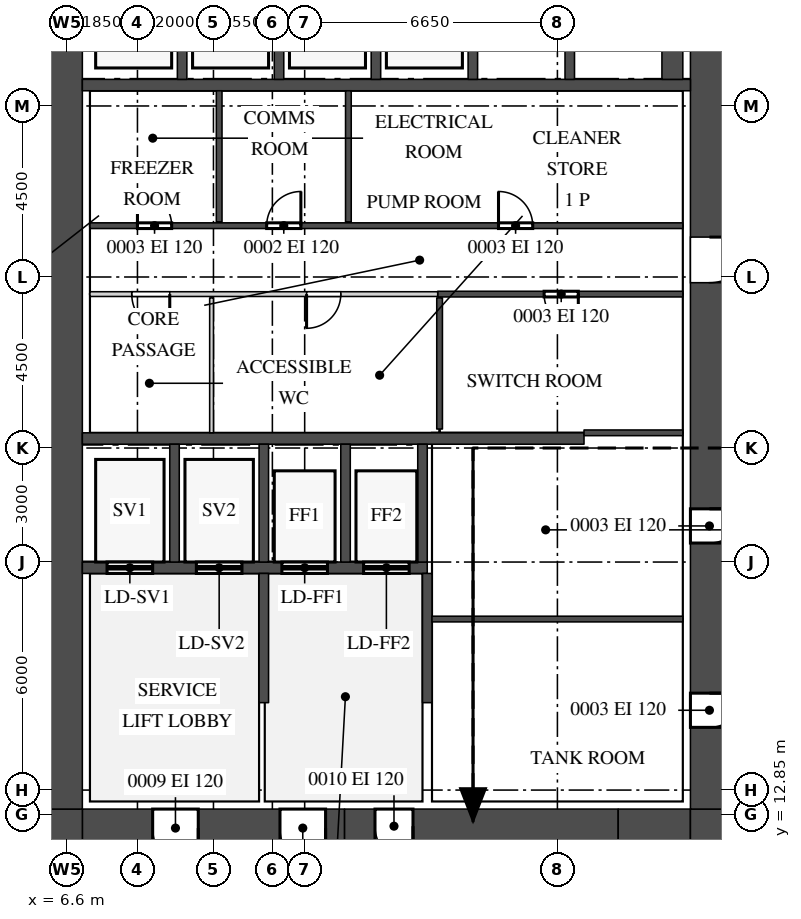
"""IFC4 building model, lengths in metres.
Left out: names, types, materials, properties, quantities, classifications, styles, units other than length and angle.
Written with IfcOpenShell. Run it as: python <this file> out.ifc"""

import sys

from ifc_helpers import new_model, si_unit, direction, frame, frame_2d, origin, place, context, subcontext, project, spatial, rectangle, extrude, source, transform, mapped, element, fill, save


model = new_model("IFC4")
c1 = context("Model", 3, precision=1e-05, world=origin(), true_north=direction((0.0, 1.0)))
c2 = subcontext(c1, "Body", "Model", "MODEL_VIEW")
j1 = project(units=[si_unit("LENGTHUNIT", "METRE"), si_unit("PLANEANGLEUNIT", "RADIAN")], contexts=[c1])
p1 = place(None, origin())
s1 = spatial("IfcSite", under=j1, at=p1, CompositionType="ELEMENT")
p2 = place(p1, origin())
s2 = spatial("IfcBuilding", under=s1, at=p2, CompositionType="ELEMENT")
p3 = place(p2, frame((0.0, 0.0, 114.7)))
s3 = spatial("IfcBuildingStorey", under=s2, at=p3, CompositionType="ELEMENT", Elevation=114.7)
m1 = source(origin(), c2, "Body", "SweptSolid", [
    extrude(rectangle(XDim=6.9, YDim=1.0, at=frame_2d((3.45, 0.0))), origin(), (0.0, 0.0, 1.0), 4.1),
])
p4 = place(p3, frame((7.0, 12.5, 0.0), z_axis=(0.0, 0.0, 1.0), x_axis=(1.0, 0.0, 0.0)))
e1 = element("IfcWall", 1, at=p4, inside=s3, PredefinedType="SHEAR", context=c2, shape_type="MappedRepresentation", body=[
    mapped(m1, transform((0.0, 0.0, 0.0))),
])
m2 = source(origin(), c2, "Body", "SweptSolid", [
    extrude(rectangle(XDim=1.2, YDim=2.1, at=frame_2d((0.6, 1.05))), frame((0.0, 0.51, 0.0), z_axis=(0.0, -1.0, 0.0), x_axis=(1.0, 0.0, 0.0)), (0.0, 0.0, 1.0), 1.02),
])
p5 = place(p4, frame((5.2, 0.0, 0.0)))
e2 = element("IfcOpeningElement", 2, at=p5, cuts=e1, PredefinedType="OPENING", context=c2, shape_type="MappedRepresentation", body=[
    mapped(m2, transform((0.0, 0.0, 0.0))),
])
p6 = place(p4, frame((1.85, 0.0, 0.0)))
e3 = element("IfcOpeningElement", 3, at=p6, cuts=e1, PredefinedType="OPENING", context=c2, shape_type="MappedRepresentation", body=[
    mapped(m2, transform((0.0, 0.0, 0.0))),
])
m3 = source(origin(), c2, "Body", "SweptSolid", [
    extrude(rectangle(XDim=7.2, YDim=0.9, at=frame_2d((3.6, 0.0))), origin(), (0.0, 0.0, 1.0), 4.1),
])
p7 = place(p3, frame((13.9, 12.55, 0.0), z_axis=(0.0, 0.0, 1.0), x_axis=(1.0, 0.0, 0.0)))
e4 = element("IfcWall", 4, at=p7, inside=s3, PredefinedType="SHEAR", context=c2, shape_type="MappedRepresentation", body=[
    mapped(m3, transform((0.0, 0.0, 0.0))),
])
m4 = source(origin(), c2, "Body", "SweptSolid", [
    extrude(rectangle(XDim=1.0, YDim=2.1, at=frame_2d((0.5, 1.05))), frame((0.0, 0.46, 0.0), z_axis=(0.0, -1.0, 0.0), x_axis=(1.0, 0.0, 0.0)), (0.0, 0.0, 1.0), 0.92),
])
p8 = place(p7, frame((0.8, 0.0, 0.0)))
e5 = element("IfcOpeningElement", 5, at=p8, cuts=e4, PredefinedType="OPENING", context=c2, shape_type="MappedRepresentation", body=[
    mapped(m4, transform((0.0, 0.0, 0.0))),
])
m5 = source(origin(), c2, "Body", "SweptSolid", [
    extrude(rectangle(XDim=1.9, YDim=1.0, at=frame_2d((0.95, 0.0))), origin(), (0.0, 0.0, 1.0), 4.1),
])
p9 = place(p3, frame((21.1, 12.5, 0.0), z_axis=(0.0, 0.0, 1.0), x_axis=(1.0, 0.0, 0.0)))
e6 = element("IfcWall", 6, at=p9, inside=s3, PredefinedType="SHEAR", context=c2, shape_type="MappedRepresentation", body=[
    mapped(m5, transform((0.0, 0.0, 0.0))),
])
m6 = source(origin(), c2, "Body", "SweptSolid", [
    extrude(rectangle(XDim=1.0, YDim=1.0, at=frame_2d((0.5, 0.0))), origin(), (0.0, 0.0, 1.0), 4.1),
])
for number, where, z_axis, x_axis in (
    (7, (23.0, 12.5, 0.0), (0.0, 0.0, 1.0), (1.0, 0.0, 0.0)),
    (8, (6.0, 12.5, 0.0), (0.0, 0.0, 1.0), (1.0, 0.0, 0.0)),
):
    element("IfcWall", number, at=place(p3, frame(where, z_axis=z_axis, x_axis=x_axis)), inside=s3, PredefinedType="SHEAR", context=c2, shape_type="MappedRepresentation", body=[
        mapped(m6, transform((0.0, 0.0, 0.0))),
    ])
m7 = source(origin(), c2, "Body", "SweptSolid", [
    extrude(rectangle(XDim=28.0, YDim=1.0, at=frame_2d((14.0, 0.0))), origin(), (0.0, 0.0, 1.0), 4.1),
])
p10 = place(p3, frame((23.5, 13.0, 0.0), z_axis=(0.0, 0.0, 1.0), x_axis=(0.0, 1.0, 0.0)))
e9 = element("IfcWall", 9, at=p10, inside=s3, PredefinedType="SHEAR", context=c2, shape_type="MappedRepresentation", body=[
    mapped(m7, transform((0.0, 0.0, 0.0))),
])
m8 = source(origin(), c2, "Body", "SweptSolid", [
    extrude(rectangle(XDim=1.8, YDim=2.1, at=frame_2d((0.9, 1.05))), frame((0.0, 0.51, 0.0), z_axis=(0.0, -1.0, 0.0), x_axis=(1.0, 0.0, 0.0)), (0.0, 0.0, 1.0), 1.02),
])
p11 = place(p10, frame((22.6, 0.0, 0.0)))
e10 = element("IfcOpeningElement", 10, at=p11, cuts=e9, PredefinedType="OPENING", context=c2, shape_type="MappedRepresentation", body=[
    mapped(m8, transform((0.0, 0.0, 0.0))),
])
p12 = place(p10, frame((13.85, 0.0, 0.0)))
e11 = element("IfcOpeningElement", 11, at=p12, cuts=e9, PredefinedType="OPENING", context=c2, shape_type="MappedRepresentation", body=[
    mapped(m2, transform((0.0, 0.0, 0.0))),
])
m9 = source(origin(), c2, "Body", "SweptSolid", [
    extrude(rectangle(XDim=0.9, YDim=2.1, at=frame_2d((0.45, 1.05))), frame((0.0, 0.51, 0.0), z_axis=(0.0, -1.0, 0.0), x_axis=(1.0, 0.0, 0.0)), (0.0, 0.0, 1.0), 1.02),
])
p13 = place(p10, frame((2.15, 0.0, 0.0)))
e12 = element("IfcOpeningElement", 12, at=p13, cuts=e9, PredefinedType="OPENING", context=c2, shape_type="MappedRepresentation", body=[
    mapped(m9, transform((0.0, 0.0, 0.0))),
])
p14 = place(p10, frame((7.0, 0.0, 0.0)))
e13 = element("IfcOpeningElement", 13, at=p14, cuts=e9, PredefinedType="OPENING", context=c2, shape_type="MappedRepresentation", body=[
    mapped(m9, transform((0.0, 0.0, 0.0))),
])
p15 = place(p3, frame((6.5, 13.0, 0.0), z_axis=(0.0, 0.0, 1.0), x_axis=(0.0, 1.0, 0.0)))
e14 = element("IfcWall", 14, at=p15, inside=s3, PredefinedType="SHEAR", context=c2, shape_type="MappedRepresentation", body=[
    mapped(m7, transform((0.0, 0.0, 0.0))),
])
m10 = source(origin(), c2, "Body", "SweptSolid", [
    extrude(rectangle(XDim=13.2, YDim=0.3, at=frame_2d((6.6, 0.0))), origin(), (0.0, 0.0, 1.0), 4.1),
])
p16 = place(p3, frame((7.0, 22.75, 0.0), z_axis=(0.0, 0.0, 1.0), x_axis=(1.0, 0.0, 0.0)))
e15 = element("IfcWall", 15, at=p16, inside=s3, PredefinedType="STANDARD", context=c2, shape_type="MappedRepresentation", body=[
    mapped(m10, transform((0.0, 0.0, 0.0))),
])
m11 = source(origin(), c2, "Body", "SweptSolid", [
    extrude(rectangle(XDim=9.075, YDim=0.3, at=frame_2d((4.538, 0.0))), origin(), (0.0, 0.0, 1.0), 4.1),
])
p17 = place(p3, frame((7.0, 19.35, 0.0), z_axis=(0.0, 0.0, 1.0), x_axis=(1.0, 0.0, 0.0)))
e16 = element("IfcWall", 16, at=p17, inside=s3, PredefinedType="STANDARD", context=c2, shape_type="MappedRepresentation", body=[
    mapped(m11, transform((0.0, 0.0, 0.0))),
])
m12 = source(origin(), c2, "Body", "SweptSolid", [
    extrude(rectangle(XDim=1.2, YDim=2.1, at=frame_2d((0.6, 1.05))), frame((0.0, 0.16, 0.0), z_axis=(0.0, -1.0, 0.0), x_axis=(1.0, 0.0, 0.0)), (0.0, 0.0, 1.0), 0.32),
])
p18 = place(p17, frame((0.65, 0.0, 0.0)))
e17 = element("IfcOpeningElement", 17, at=p18, cuts=e16, PredefinedType="OPENING", context=c2, shape_type="MappedRepresentation", body=[
    mapped(m12, transform((0.0, 0.0, 0.0))),
])
p19 = place(p17, frame((3.0, 0.0, 0.0)))
e18 = element("IfcOpeningElement", 18, at=p19, cuts=e16, PredefinedType="OPENING", context=c2, shape_type="MappedRepresentation", body=[
    mapped(m12, transform((0.0, 0.0, 0.0))),
])
p20 = place(p17, frame((5.25, 0.0, 0.0)))
e19 = element("IfcOpeningElement", 19, at=p20, cuts=e16, PredefinedType="OPENING", context=c2, shape_type="MappedRepresentation", body=[
    mapped(m12, transform((0.0, 0.0, 0.0))),
])
p21 = place(p17, frame((7.4, 0.0, 0.0)))
e20 = element("IfcOpeningElement", 20, at=p21, cuts=e16, PredefinedType="OPENING", context=c2, shape_type="MappedRepresentation", body=[
    mapped(m12, transform((0.0, 0.0, 0.0))),
])
m13 = source(origin(), c2, "Body", "SweptSolid", [
    extrude(rectangle(XDim=16.0, YDim=0.3, at=frame_2d((8.0, 0.0))), origin(), (0.0, 0.0, 1.0), 4.1),
])
p22 = place(p3, frame((7.0, 32.05, 0.0), z_axis=(0.0, 0.0, 1.0), x_axis=(1.0, 0.0, 0.0)))
e21 = element("IfcWall", 21, at=p22, inside=s3, PredefinedType="STANDARD", context=c2, shape_type="MappedRepresentation", body=[
    mapped(m13, transform((0.0, 0.0, 0.0))),
])
m14 = source(origin(), c2, "Body", "SweptSolid", [
    extrude(rectangle(XDim=3.1, YDim=0.25, at=frame_2d((1.55, 0.0))), origin(), (0.0, 0.0, 1.0), 4.1),
])
for number, where, z_axis, x_axis in (
    (22, (9.425, 19.5, 0.0), (0.0, 0.0, 1.0), (0.0, 1.0, 0.0)),
    (23, (11.775, 19.5, 0.0), (0.0, 0.0, 1.0), (0.0, 1.0, 0.0)),
    (24, (13.925, 19.5, 0.0), (0.0, 0.0, 1.0), (0.0, 1.0, 0.0)),
    (25, (15.95, 19.5, 0.0), (0.0, 0.0, 1.0), (0.0, 1.0, 0.0)),
):
    element("IfcWall", number, at=place(p3, frame(where, z_axis=z_axis, x_axis=x_axis)), inside=s3, PredefinedType="STANDARD", context=c2, shape_type="MappedRepresentation", body=[
        mapped(m14, transform((0.0, 0.0, 0.0))),
    ])
m15 = source(origin(), c2, "Body", "SweptSolid", [
    extrude(rectangle(XDim=2.4, YDim=0.25, at=frame_2d((1.2, 0.0))), origin(), (0.0, 0.0, 1.0), 4.1),
])
for number, where, z_axis, x_axis in (
    (26, (9.625, 32.2, 0.0), (0.0, 0.0, 1.0), (0.0, 1.0, 0.0)),
    (27, (12.175, 32.2, 0.0), (0.0, 0.0, 1.0), (0.0, 1.0, 0.0)),
    (28, (14.725, 32.2, 0.0), (0.0, 0.0, 1.0), (0.0, 1.0, 0.0)),
    (29, (17.275, 32.2, 0.0), (0.0, 0.0, 1.0), (0.0, 1.0, 0.0)),
    (30, (19.825, 32.2, 0.0), (0.0, 0.0, 1.0), (0.0, 1.0, 0.0)),
):
    element("IfcWall", number, at=place(p3, frame(where, z_axis=z_axis, x_axis=x_axis)), inside=s3, PredefinedType="STANDARD", context=c2, shape_type="MappedRepresentation", body=[
        mapped(m15, transform((0.0, 0.0, 0.0))),
    ])
m16 = source(origin(), c2, "Body", "SweptSolid", [
    extrude(rectangle(XDim=2.4, YDim=0.55, at=frame_2d((1.2, 0.0))), origin(), (0.0, 0.0, 1.0), 4.1),
])
p23 = place(p3, frame((22.525, 32.2, 0.0), z_axis=(0.0, 0.0, 1.0), x_axis=(0.0, 1.0, 0.0)))
e31 = element("IfcWall", 31, at=p23, inside=s3, PredefinedType="STANDARD", context=c2, shape_type="MappedRepresentation", body=[
    mapped(m16, transform((0.0, 0.0, 0.0))),
])
m17 = source(origin(), c2, "Body", "SweptSolid", [
    extrude(rectangle(XDim=3.4, YDim=0.25, at=frame_2d((1.7, 0.0))), origin(), (0.0, 0.0, 1.0), 4.1),
])
for number, where, z_axis, x_axis in (
    (32, (16.075, 15.8, 0.0), (0.0, 0.0, 1.0), (0.0, 1.0, 0.0)),
    (33, (11.775, 15.8, 0.0), (0.0, 0.0, 1.0), (0.0, 1.0, 0.0)),
):
    element("IfcWall", number, at=place(p3, frame(where, z_axis=z_axis, x_axis=x_axis)), inside=s3, PredefinedType="STANDARD", context=c2, shape_type="MappedRepresentation", body=[
        mapped(m17, transform((0.0, 0.0, 0.0))),
    ])
m18 = source(origin(), c2, "Body", "SweptSolid", [
    extrude(rectangle(XDim=6.6, YDim=0.15, at=frame_2d((3.3, 0.0))), origin(), (0.0, 0.0, 1.0), 4.2),
])
p24 = place(p3, frame((16.2, 18.0, 0.0), z_axis=(0.0, 0.0, 1.0), x_axis=(1.0, 0.0, 0.0)))
e34 = element("IfcWall", 34, at=p24, inside=s3, PredefinedType="PARTITIONING", context=c2, shape_type="MappedRepresentation", body=[
    mapped(m18, transform((0.0, 0.0, 0.0))),
])
m19 = source(origin(), c2, "Body", "SweptSolid", [
    extrude(rectangle(XDim=3.55, YDim=0.1, at=frame_2d((1.775, 0.0))), origin(), (0.0, 0.0, 1.0), 4.2),
])
p25 = place(p3, frame((10.4, 22.9, 0.0), z_axis=(0.0, 0.0, 1.0), x_axis=(0.0, 1.0, 0.0)))
e35 = element("IfcWall", 35, at=p25, inside=s3, PredefinedType="PARTITIONING", context=c2, shape_type="MappedRepresentation", body=[
    mapped(m19, transform((0.0, 0.0, 0.0))),
])
m20 = source(origin(), c2, "Body", "SweptSolid", [
    extrude(rectangle(XDim=2.6, YDim=0.15, at=frame_2d((1.3, 0.0))), origin(), (0.0, 0.0, 1.0), 4.2),
])
p26 = place(p3, frame((20.2, 22.9, 0.0), z_axis=(0.0, 0.0, 1.0), x_axis=(1.0, 0.0, 0.0)))
e36 = element("IfcWall", 36, at=p26, inside=s3, PredefinedType="PARTITIONING", context=c2, shape_type="MappedRepresentation", body=[
    mapped(m20, transform((0.0, 0.0, 0.0))),
])
m21 = source(origin(), c2, "Body", "SweptSolid", [
    extrude(rectangle(XDim=3.45, YDim=0.15, at=frame_2d((1.725, 0.0))), origin(), (0.0, 0.0, 1.0), 4.2),
])
p27 = place(p3, frame((16.4, 23.0, 0.0), z_axis=(0.0, 0.0, 1.0), x_axis=(0.0, 1.0, 0.0)))
e37 = element("IfcWall", 37, at=p27, inside=s3, PredefinedType="PARTITIONING", context=c2, shape_type="MappedRepresentation", body=[
    mapped(m21, transform((0.0, 0.0, 0.0))),
])
m22 = source(origin(), c2, "Body", "SweptSolid", [
    extrude(rectangle(XDim=9.15, YDim=0.125, at=frame_2d((4.575, 0.0))), origin(), (0.0, 0.0, 1.0), 4.2),
])
p28 = place(p3, frame((7.2, 26.55, 0.0), z_axis=(0.0, 0.0, 1.0), x_axis=(1.0, 0.0, 0.0)))
e38 = element("IfcWall", 38, at=p28, inside=s3, PredefinedType="PARTITIONING", context=c2, shape_type="MappedRepresentation", body=[
    mapped(m22, transform((0.0, 0.0, 0.0))),
])
m23 = source(origin(), c2, "Body", "SweptSolid", [
    extrude(rectangle(XDim=1.0, YDim=2.1, at=frame_2d((0.5, 1.05))), frame((0.0, 0.073, 0.0), z_axis=(0.0, -1.0, 0.0), x_axis=(1.0, 0.0, 0.0)), (0.0, 0.0, 1.0), 0.145),
])
p29 = place(p28, frame((1.1, 0.0, 0.0)))
e39 = element("IfcOpeningElement", 39, at=p29, cuts=e38, PredefinedType="OPENING", context=c2, shape_type="MappedRepresentation", body=[
    mapped(m23, transform((0.0, 0.0, 0.0))),
])
m24 = source(origin(), c2, "Body", "SweptSolid", [
    extrude(rectangle(XDim=0.9, YDim=2.1, at=frame_2d((0.45, 1.05))), frame((0.0, 0.073, 0.0), z_axis=(0.0, -1.0, 0.0), x_axis=(1.0, 0.0, 0.0)), (0.0, 0.0, 1.0), 0.145),
])
p30 = place(p28, frame((5.7, 0.0, 0.0)))
e40 = element("IfcOpeningElement", 40, at=p30, cuts=e38, PredefinedType="OPENING", context=c2, shape_type="MappedRepresentation", body=[
    mapped(m24, transform((0.0, 0.0, 0.0))),
])
m25 = source(origin(), c2, "Body", "SweptSolid", [
    extrude(rectangle(XDim=6.45, YDim=0.15, at=frame_2d((3.225, 0.0))), origin(), (0.0, 0.0, 1.0), 4.2),
])
p31 = place(p3, frame((16.35, 26.55, 0.0), z_axis=(0.0, 0.0, 1.0), x_axis=(1.0, 0.0, 0.0)))
e41 = element("IfcWall", 41, at=p31, inside=s3, PredefinedType="PARTITIONING", context=c2, shape_type="MappedRepresentation", body=[
    mapped(m25, transform((0.0, 0.0, 0.0))),
])
m26 = source(origin(), c2, "Body", "SweptSolid", [
    extrude(rectangle(XDim=0.9, YDim=2.1, at=frame_2d((0.45, 1.05))), frame((0.0, 0.085, 0.0), z_axis=(0.0, -1.0, 0.0), x_axis=(1.0, 0.0, 0.0)), (0.0, 0.0, 1.0), 0.17),
])
p32 = place(p31, frame((2.8, 0.0, 0.0)))
e42 = element("IfcOpeningElement", 42, at=p32, cuts=e41, PredefinedType="OPENING", context=c2, shape_type="MappedRepresentation", body=[
    mapped(m26, transform((0.0, 0.0, 0.0))),
])
m27 = source(origin(), c2, "Body", "SweptSolid", [
    extrude(rectangle(XDim=15.6, YDim=0.15, at=frame_2d((7.8, 0.0))), origin(), (0.0, 0.0, 1.0), 4.2),
])
p33 = place(p3, frame((7.2, 28.35, 0.0), z_axis=(0.0, 0.0, 1.0), x_axis=(1.0, 0.0, 0.0)))
e43 = element("IfcWall", 43, at=p33, inside=s3, PredefinedType="PARTITIONING", context=c2, shape_type="MappedRepresentation", body=[
    mapped(m27, transform((0.0, 0.0, 0.0))),
])
p34 = place(p33, frame((1.25, 0.0, 0.0)))
e44 = element("IfcOpeningElement", 44, at=p34, cuts=e43, PredefinedType="OPENING", context=c2, shape_type="MappedRepresentation", body=[
    mapped(m26, transform((0.0, 0.0, 0.0))),
])
p35 = place(p33, frame((4.65, 0.0, 0.0)))
e45 = element("IfcOpeningElement", 45, at=p35, cuts=e43, PredefinedType="OPENING", context=c2, shape_type="MappedRepresentation", body=[
    mapped(m26, transform((0.0, 0.0, 0.0))),
])
p36 = place(p33, frame((10.75, 0.0, 0.0)))
e46 = element("IfcOpeningElement", 46, at=p36, cuts=e43, PredefinedType="OPENING", context=c2, shape_type="MappedRepresentation", body=[
    mapped(m26, transform((0.0, 0.0, 0.0))),
])
for number, where, z_axis, x_axis in (
    (47, (10.6, 28.45, 0.0), (0.0, 0.0, 1.0), (0.0, 1.0, 0.0)),
    (48, (14.0, 28.45, 0.0), (0.0, 0.0, 1.0), (0.0, 1.0, 0.0)),
):
    element("IfcWall", number, at=place(p3, frame(where, z_axis=z_axis, x_axis=x_axis)), inside=s3, PredefinedType="PARTITIONING", context=c2, shape_type="MappedRepresentation", body=[
        mapped(m21, transform((0.0, 0.0, 0.0))),
    ])
m28 = source(origin(), c2, "Body", "SweptSolid", [
    extrude(rectangle(XDim=1.2, YDim=2.1, at=frame_2d((0.6, 1.05))), frame((0.0, 0.45, 0.0), z_axis=(0.0, -1.0, 0.0), x_axis=(1.0, 0.0, 0.0)), (0.0, 0.0, 1.0), 0.9),
])
p37 = place(p12, origin())
e49 = element("IfcDoor", 49, at=p37, inside=s3, OperationType="SINGLE_SWING_RIGHT", PredefinedType="DOOR", context=c2, shape_type="MappedRepresentation", body=[
    mapped(m28, transform((0.0, 0.0, 0.0))),
])
fill(e11, e49)
m29 = source(origin(), c2, "Body", "SweptSolid", [
    extrude(rectangle(XDim=0.9, YDim=2.1, at=frame_2d((0.45, 1.05))), frame((0.0, 0.025, 0.0), z_axis=(0.0, -1.0, 0.0), x_axis=(1.0, 0.0, 0.0)), (0.0, 0.0, 1.0), 0.05),
])
p38 = place(p34, origin())
e50 = element("IfcDoor", 50, at=p38, inside=s3, OperationType="SINGLE_SWING_RIGHT", PredefinedType="DOOR", context=c2, shape_type="MappedRepresentation", body=[
    mapped(m29, transform((0.0, 0.0, 0.0))),
])
fill(e44, e50)
p39 = place(p35, origin())
e51 = element("IfcDoor", 51, at=p39, inside=s3, OperationType="SINGLE_SWING_LEFT", PredefinedType="DOOR", context=c2, shape_type="MappedRepresentation", body=[
    mapped(m29, transform((0.0, 0.0, 0.0))),
])
fill(e45, e51)
p40 = place(p36, origin())
e52 = element("IfcDoor", 52, at=p40, inside=s3, OperationType="SINGLE_SWING_RIGHT", PredefinedType="DOOR", context=c2, shape_type="MappedRepresentation", body=[
    mapped(m29, transform((0.0, 0.0, 0.0))),
])
fill(e46, e52)
m30 = source(origin(), c2, "Body", "SweptSolid", [
    extrude(rectangle(XDim=1.0, YDim=2.1, at=frame_2d((0.5, 1.05))), frame((0.0, 0.025, 0.0), z_axis=(0.0, -1.0, 0.0), x_axis=(1.0, 0.0, 0.0)), (0.0, 0.0, 1.0), 0.05),
])
p41 = place(p29, origin())
e53 = element("IfcDoor", 53, at=p41, inside=s3, OperationType="SINGLE_SWING_RIGHT", PredefinedType="DOOR", context=c2, shape_type="MappedRepresentation", body=[
    mapped(m30, transform((0.0, 0.0, 0.0))),
])
fill(e39, e53)
p42 = place(p30, origin())
e54 = element("IfcDoor", 54, at=p42, inside=s3, OperationType="SINGLE_SWING_LEFT", PredefinedType="DOOR", context=c2, shape_type="MappedRepresentation", body=[
    mapped(m29, transform((0.0, 0.0, 0.0))),
])
fill(e40, e54)
p43 = place(p32, origin())
e55 = element("IfcDoor", 55, at=p43, inside=s3, OperationType="SINGLE_SWING_RIGHT", PredefinedType="DOOR", context=c2, shape_type="MappedRepresentation", body=[
    mapped(m29, transform((0.0, 0.0, 0.0))),
])
fill(e42, e55)
m31 = source(origin(), c2, "Body", "SweptSolid", [
    extrude(rectangle(XDim=0.9, YDim=2.1, at=frame_2d((0.45, 1.05))), frame((0.0, 0.45, 0.0), z_axis=(0.0, -1.0, 0.0), x_axis=(1.0, 0.0, 0.0)), (0.0, 0.0, 1.0), 0.9),
])
p44 = place(p13, origin())
e56 = element("IfcDoor", 56, at=p44, inside=s3, OperationType="SINGLE_SWING_RIGHT", PredefinedType="DOOR", context=c2, shape_type="MappedRepresentation", body=[
    mapped(m31, transform((0.0, 0.0, 0.0))),
])
fill(e12, e56)
p45 = place(p14, origin())
e57 = element("IfcDoor", 57, at=p45, inside=s3, OperationType="SINGLE_SWING_RIGHT", PredefinedType="DOOR", context=c2, shape_type="MappedRepresentation", body=[
    mapped(m31, transform((0.0, 0.0, 0.0))),
])
fill(e13, e57)
p46 = place(p5, origin())
e58 = element("IfcDoor", 58, at=p46, inside=s3, OperationType="SINGLE_SWING_RIGHT", PredefinedType="DOOR", context=c2, shape_type="MappedRepresentation", body=[
    mapped(m28, transform((0.0, 0.0, 0.0))),
])
fill(e2, e58)
p47 = place(p6, origin())
e59 = element("IfcDoor", 59, at=p47, inside=s3, OperationType="SINGLE_SWING_RIGHT", PredefinedType="DOOR", context=c2, shape_type="MappedRepresentation", body=[
    mapped(m28, transform((0.0, 0.0, 0.0))),
])
fill(e3, e59)
m32 = source(origin(), c2, "Body", "SweptSolid", [
    extrude(rectangle(XDim=1.0, YDim=2.1, at=frame_2d((0.5, 1.05))), frame((0.0, 0.4, 0.0), z_axis=(0.0, -1.0, 0.0), x_axis=(1.0, 0.0, 0.0)), (0.0, 0.0, 1.0), 0.8),
])
p48 = place(p8, origin())
e60 = element("IfcDoor", 60, at=p48, inside=s3, OperationType="SINGLE_SWING_RIGHT", PredefinedType="DOOR", context=c2, shape_type="MappedRepresentation", body=[
    mapped(m32, transform((0.0, 0.0, 0.0))),
])
fill(e5, e60)
m33 = source(origin(), c2, "Body", "SweptSolid", [
    extrude(rectangle(XDim=1.2, YDim=2.1, at=frame_2d((0.6, 1.05))), frame((0.0, 0.025, 0.0), z_axis=(0.0, -1.0, 0.0), x_axis=(1.0, 0.0, 0.0)), (0.0, 0.0, 1.0), 0.05),
])
p49 = place(p18, origin())
e61 = element("IfcDoor", 61, at=p49, inside=s3, OperationType="DOUBLE_DOOR_SLIDING", PredefinedType="DOOR", context=c2, shape_type="MappedRepresentation", body=[
    mapped(m33, transform((0.0, 0.0, 0.0))),
])
fill(e17, e61)
p50 = place(p19, origin())
e62 = element("IfcDoor", 62, at=p50, inside=s3, OperationType="DOUBLE_DOOR_SLIDING", PredefinedType="DOOR", context=c2, shape_type="MappedRepresentation", body=[
    mapped(m33, transform((0.0, 0.0, 0.0))),
])
fill(e18, e62)
p51 = place(p20, origin())
e63 = element("IfcDoor", 63, at=p51, inside=s3, OperationType="DOUBLE_DOOR_SLIDING", PredefinedType="DOOR", context=c2, shape_type="MappedRepresentation", body=[
    mapped(m33, transform((0.0, 0.0, 0.0))),
])
fill(e19, e63)
p52 = place(p21, origin())
e64 = element("IfcDoor", 64, at=p52, inside=s3, OperationType="DOUBLE_DOOR_SLIDING", PredefinedType="DOOR", context=c2, shape_type="MappedRepresentation", body=[
    mapped(m33, transform((0.0, 0.0, 0.0))),
])
fill(e20, e64)
save(model, sys.argv[1])
